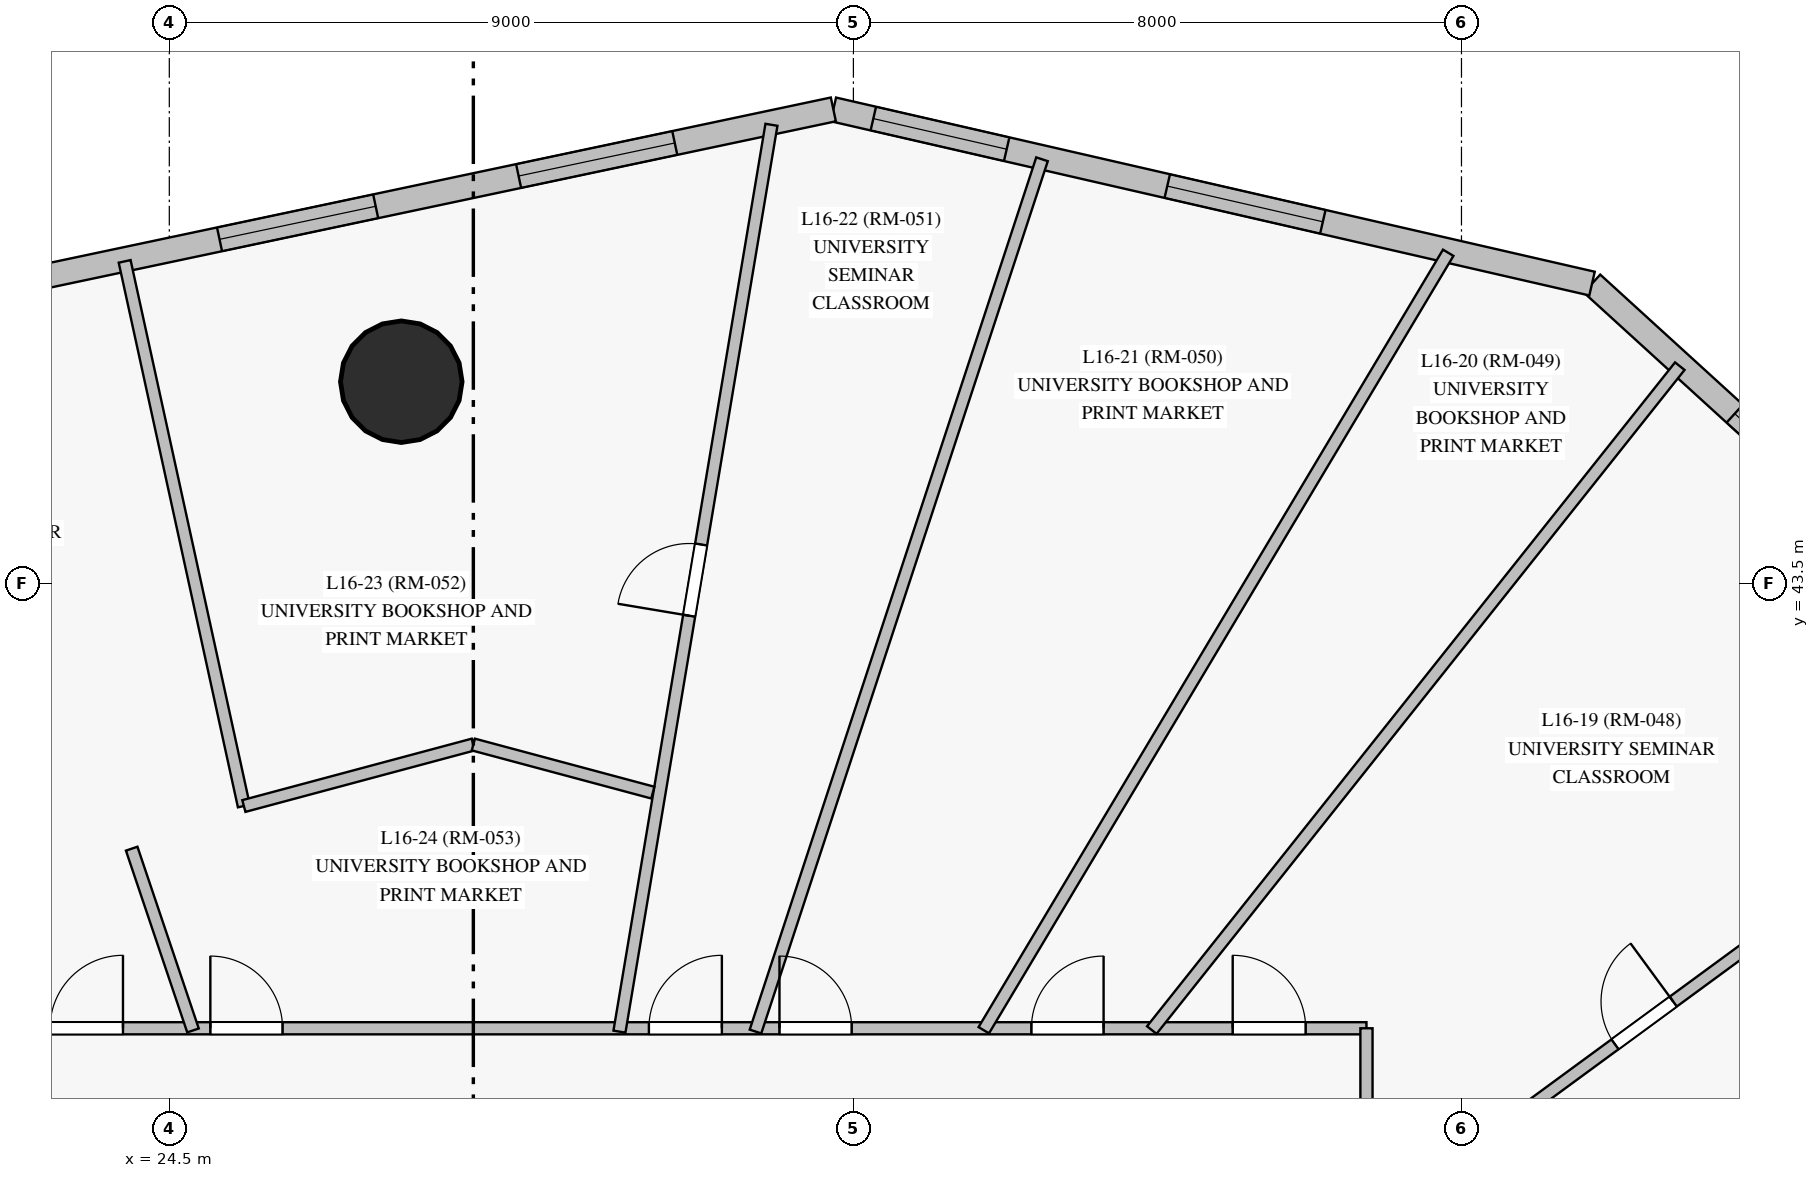
"""IFC4 building model, lengths in metres.
Left out: names, types, materials, properties, quantities, classifications, styles, units other than length and angle.
Written with IfcOpenShell. Run it as: python <this file> out.ifc"""

import sys

from ifc_helpers import new_model, si_unit, direction, frame, frame_2d, origin, origin_with_axes, origin_2d, place, context, subcontext, project, spatial, rectangle, circle, extrude, source, transform, mapped, element, fill, save


model = new_model("IFC4")
c1 = context("Model", 3, precision=1e-05, world=origin(), true_north=direction((0.0, 1.0)))
c2 = subcontext(c1, "Body", "Model", "MODEL_VIEW")
j1 = project(units=[si_unit("LENGTHUNIT", "METRE"), si_unit("PLANEANGLEUNIT", "RADIAN")], contexts=[c1])
p1 = place(None, origin())
s1 = spatial("IfcSite", under=j1, at=p1, CompositionType="ELEMENT")
p2 = place(p1, origin())
s2 = spatial("IfcBuilding", under=s1, at=p2, CompositionType="ELEMENT")
p3 = place(p2, frame((0.0, 0.0, 62.5)))
s3 = spatial("IfcBuildingStorey", under=s2, at=p3, CompositionType="ELEMENT", Elevation=62.5)
m1 = source(origin_with_axes(), c2, "Body", "SweptSolid", [
    extrude(circle(Radius=0.8, at=origin_2d()), origin(), (0.0, 0.0, 1.0), 3.6),
])
p4 = place(p3, frame((27.552, 46.156, 0.0), z_axis=(0.0, 0.0, 1.0), x_axis=(1.0, 0.0, 0.0)))
e1 = element("IfcColumn", 1, at=p4, inside=s3, PredefinedType="COLUMN", context=c2, shape_type="MappedRepresentation", body=[
    mapped(m1, transform((0.0, 0.0, 0.0), scale=1.0)),
])
p5 = place(p3, frame((52.626, 38.872, 0.0), z_axis=(0.0, 0.0, 1.0), x_axis=(-0.739069015005, 0.673629713611, 0.0)))
e2 = element("IfcWall", 2, at=p5, inside=s3, PredefinedType="SOLIDWALL", context=c2, shape_type="SweptSolid", body=[
    extrude(rectangle(XDim=12.729, YDim=0.32, at=frame_2d((6.365, 0.0))), origin(), (0.0, 0.0, 1.0), 3.02),
])
p6 = place(p5, frame((1.622, 0.0, 0.85)))
e3 = element("IfcOpeningElement", 3, at=p6, cuts=e2, PredefinedType="OPENING", context=c2, shape_type="SweptSolid", body=[
    extrude(rectangle(XDim=1.5, YDim=1.85, at=frame_2d((0.75, 0.925))), frame((0.0, 0.17, 0.0), z_axis=(0.0, -1.0, 0.0), x_axis=(1.0, 0.0, 0.0)), (0.0, 0.0, 1.0), 0.34),
])
p7 = place(p5, frame((8.089, 0.0, 0.85)))
e4 = element("IfcOpeningElement", 4, at=p7, cuts=e2, PredefinedType="OPENING", context=c2, shape_type="SweptSolid", body=[
    extrude(rectangle(XDim=2.1, YDim=1.95, at=frame_2d((1.05, 0.975))), frame((0.0, 0.17, 0.0), z_axis=(0.0, -1.0, 0.0), x_axis=(1.0, 0.0, 0.0)), (0.0, 0.0, 1.0), 0.34),
])
p8 = place(p3, frame((43.218, 47.447, 0.0), z_axis=(0.0, 0.0, 1.0), x_axis=(-0.974645302581, 0.223755523188, 0.0)))
e5 = element("IfcWall", 5, at=p8, inside=s3, PredefinedType="SOLIDWALL", context=c2, shape_type="SweptSolid", body=[
    extrude(rectangle(XDim=10.241, YDim=0.32, at=frame_2d((5.121, 0.0))), origin(), (0.0, 0.0, 1.0), 3.35),
])
p9 = place(p8, frame((3.634, 0.0, 0.85)))
e6 = element("IfcOpeningElement", 6, at=p9, cuts=e5, PredefinedType="OPENING", context=c2, shape_type="SweptSolid", body=[
    extrude(rectangle(XDim=2.1, YDim=1.95, at=frame_2d((1.05, 0.975))), frame((0.0, 0.17, 0.0), z_axis=(0.0, -1.0, 0.0), x_axis=(1.0, 0.0, 0.0)), (0.0, 0.0, 1.0), 0.34),
])
p10 = place(p8, frame((7.901, 0.0, 0.85)))
e7 = element("IfcOpeningElement", 7, at=p10, cuts=e5, PredefinedType="OPENING", context=c2, shape_type="SweptSolid", body=[
    extrude(rectangle(XDim=1.8, YDim=1.85, at=frame_2d((0.9, 0.925))), frame((0.0, 0.17, 0.0), z_axis=(0.0, -1.0, 0.0), x_axis=(1.0, 0.0, 0.0)), (0.0, 0.0, 1.0), 0.34),
])
p11 = place(p3, frame((33.236, 49.739, 0.0), z_axis=(0.0, 0.0, 1.0), x_axis=(-0.9783201392, -0.207098298485, 0.0)))
e8 = element("IfcWall", 8, at=p11, inside=s3, PredefinedType="SOLIDWALL", context=c2, shape_type="SweptSolid", body=[
    extrude(rectangle(XDim=14.861, YDim=0.32, at=frame_2d((7.43, 0.0))), origin(), (0.0, 0.0, 1.0), 3.35),
])
p12 = place(p11, frame((2.133, 0.0, 0.85)))
e9 = element("IfcOpeningElement", 9, at=p12, cuts=e8, PredefinedType="OPENING", context=c2, shape_type="SweptSolid", body=[
    extrude(rectangle(XDim=2.1, YDim=1.95, at=frame_2d((1.05, 0.975))), frame((0.0, 0.17, 0.0), z_axis=(0.0, -1.0, 0.0), x_axis=(1.0, 0.0, 0.0)), (0.0, 0.0, 1.0), 0.34),
])
p13 = place(p11, frame((6.155, 0.0, 0.85)))
e10 = element("IfcOpeningElement", 10, at=p13, cuts=e8, PredefinedType="OPENING", context=c2, shape_type="SweptSolid", body=[
    extrude(rectangle(XDim=2.1, YDim=1.95, at=frame_2d((1.05, 0.975))), frame((0.0, 0.17, 0.0), z_axis=(0.0, -1.0, 0.0), x_axis=(1.0, 0.0, 0.0)), (0.0, 0.0, 1.0), 0.34),
])
p14 = place(p11, frame((11.118, 0.0, 0.85)))
e11 = element("IfcOpeningElement", 11, at=p14, cuts=e8, PredefinedType="OPENING", context=c2, shape_type="SweptSolid", body=[
    extrude(rectangle(XDim=2.1, YDim=1.95, at=frame_2d((1.05, 0.975))), frame((0.0, 0.17, 0.0), z_axis=(0.0, -1.0, 0.0), x_axis=(1.0, 0.0, 0.0)), (0.0, 0.0, 1.0), 0.34),
])
p15 = place(p3, frame((10.5, 37.65, 0.0), z_axis=(0.0, 0.0, 1.0), x_axis=(1.0, 0.0, 0.0)))
e12 = element("IfcWall", 12, at=p15, inside=s3, PredefinedType="PARTITIONING", context=c2, shape_type="SweptSolid", body=[
    extrude(rectangle(XDim=29.75, YDim=0.16, at=frame_2d((14.875, 0.0))), origin(), (0.0, 0.0, 1.0), 2.75),
])
p16 = place(p15, frame((27.99, 0.0, 0.0)))
e13 = element("IfcOpeningElement", 13, at=p16, cuts=e12, PredefinedType="OPENING", context=c2, shape_type="SweptSolid", body=[
    extrude(rectangle(XDim=0.96, YDim=2.15, at=frame_2d((0.48, 1.075))), frame((0.0, 0.09, 0.0), z_axis=(0.0, -1.0, 0.0), x_axis=(1.0, 0.0, 0.0)), (0.0, 0.0, 1.0), 0.18),
])
p17 = place(p15, frame((25.342, 0.0, 0.0)))
e14 = element("IfcOpeningElement", 14, at=p17, cuts=e12, PredefinedType="OPENING", context=c2, shape_type="SweptSolid", body=[
    extrude(rectangle(XDim=0.95, YDim=2.15, at=frame_2d((0.475, 1.075))), frame((0.0, 0.09, 0.0), z_axis=(0.0, -1.0, 0.0), x_axis=(1.0, 0.0, 0.0)), (0.0, 0.0, 1.0), 0.18),
])
p18 = place(p15, frame((22.028, 0.0, 0.0)))
e15 = element("IfcOpeningElement", 15, at=p18, cuts=e12, PredefinedType="OPENING", context=c2, shape_type="SweptSolid", body=[
    extrude(rectangle(XDim=0.95, YDim=2.15, at=frame_2d((0.475, 1.075))), frame((0.0, 0.09, 0.0), z_axis=(0.0, -1.0, 0.0), x_axis=(1.0, 0.0, 0.0)), (0.0, 0.0, 1.0), 0.18),
])
p19 = place(p15, frame((20.31, 0.0, 0.0)))
e16 = element("IfcOpeningElement", 16, at=p19, cuts=e12, PredefinedType="OPENING", context=c2, shape_type="SweptSolid", body=[
    extrude(rectangle(XDim=0.96, YDim=2.15, at=frame_2d((0.48, 1.075))), frame((0.0, 0.09, 0.0), z_axis=(0.0, -1.0, 0.0), x_axis=(1.0, 0.0, 0.0)), (0.0, 0.0, 1.0), 0.18),
])
p20 = place(p15, frame((14.54, 0.0, 0.0)))
e17 = element("IfcOpeningElement", 17, at=p20, cuts=e12, PredefinedType="OPENING", context=c2, shape_type="SweptSolid", body=[
    extrude(rectangle(XDim=0.95, YDim=2.15, at=frame_2d((0.475, 1.075))), frame((0.0, 0.09, 0.0), z_axis=(0.0, -1.0, 0.0), x_axis=(1.0, 0.0, 0.0)), (0.0, 0.0, 1.0), 0.18),
])
p21 = place(p15, frame((12.43, 0.0, 0.0)))
e18 = element("IfcOpeningElement", 18, at=p21, cuts=e12, PredefinedType="OPENING", context=c2, shape_type="SweptSolid", body=[
    extrude(rectangle(XDim=0.96, YDim=2.15, at=frame_2d((0.48, 1.075))), frame((0.0, 0.09, 0.0), z_axis=(0.0, -1.0, 0.0), x_axis=(1.0, 0.0, 0.0)), (0.0, 0.0, 1.0), 0.18),
])
p22 = place(p15, frame((9.938, 0.0, 0.0)))
e19 = element("IfcOpeningElement", 19, at=p22, cuts=e12, PredefinedType="OPENING", context=c2, shape_type="SweptSolid", body=[
    extrude(rectangle(XDim=0.95, YDim=2.15, at=frame_2d((0.475, 1.075))), frame((0.0, 0.09, 0.0), z_axis=(0.0, -1.0, 0.0), x_axis=(1.0, 0.0, 0.0)), (0.0, 0.0, 1.0), 0.18),
])
p23 = place(p15, frame((6.962, 0.0, 0.0)))
e20 = element("IfcOpeningElement", 20, at=p23, cuts=e12, PredefinedType="OPENING", context=c2, shape_type="SweptSolid", body=[
    extrude(rectangle(XDim=0.95, YDim=2.15, at=frame_2d((0.475, 1.075))), frame((0.0, 0.09, 0.0), z_axis=(0.0, -1.0, 0.0), x_axis=(1.0, 0.0, 0.0)), (0.0, 0.0, 1.0), 0.18),
])
p24 = place(p3, frame((40.25, 37.65, 0.0), z_axis=(0.0, 0.0, 1.0), x_axis=(0.0, -1.0, 0.0)))
e21 = element("IfcWall", 21, at=p24, inside=s3, PredefinedType="PARTITIONING", context=c2, shape_type="SweptSolid", body=[
    extrude(rectangle(XDim=22.3, YDim=0.16, at=frame_2d((11.15, 0.0))), origin(), (0.0, 0.0, 1.0), 2.75),
])
p25 = place(p24, frame((16.25, 0.0, 0.0)))
e22 = element("IfcOpeningElement", 22, at=p25, cuts=e21, PredefinedType="OPENING", context=c2, shape_type="SweptSolid", body=[
    extrude(rectangle(XDim=0.95, YDim=2.15, at=frame_2d((0.475, 1.075))), frame((0.0, 0.09, 0.0), z_axis=(0.0, -1.0, 0.0), x_axis=(1.0, 0.0, 0.0)), (0.0, 0.0, 1.0), 0.18),
])
p26 = place(p24, frame((13.83, 0.0, 0.0)))
e23 = element("IfcOpeningElement", 23, at=p26, cuts=e21, PredefinedType="OPENING", context=c2, shape_type="SweptSolid", body=[
    extrude(rectangle(XDim=0.96, YDim=2.15, at=frame_2d((0.48, 1.075))), frame((0.0, 0.09, 0.0), z_axis=(0.0, -1.0, 0.0), x_axis=(1.0, 0.0, 0.0)), (0.0, 0.0, 1.0), 0.18),
])
p27 = place(p24, frame((10.385, 0.0, 0.0)))
e24 = element("IfcOpeningElement", 24, at=p27, cuts=e21, PredefinedType="OPENING", context=c2, shape_type="SweptSolid", body=[
    extrude(rectangle(XDim=0.95, YDim=2.15, at=frame_2d((0.475, 1.075))), frame((0.0, 0.09, 0.0), z_axis=(0.0, -1.0, 0.0), x_axis=(1.0, 0.0, 0.0)), (0.0, 0.0, 1.0), 0.18),
])
p28 = place(p3, frame((30.422, 37.606, 0.0), z_axis=(0.0, 0.0, 1.0), x_axis=(0.16531531348, 0.986240765295, 0.0)))
e25 = element("IfcWall", 25, at=p28, inside=s3, PredefinedType="PARTITIONING", context=c2, shape_type="SweptSolid", body=[
    extrude(rectangle(XDim=12.097, YDim=0.16, at=frame_2d((6.048, 0.0))), origin(), (0.0, 0.0, 1.0), 3.35),
])
p29 = place(p28, frame((5.548, 0.0, 0.0)))
e26 = element("IfcOpeningElement", 26, at=p29, cuts=e25, PredefinedType="OPENING", context=c2, shape_type="SweptSolid", body=[
    extrude(rectangle(XDim=0.95, YDim=2.15, at=frame_2d((0.475, 1.075))), frame((0.0, 0.09, 0.0), z_axis=(0.0, -1.0, 0.0), x_axis=(1.0, 0.0, 0.0)), (0.0, 0.0, 1.0), 0.18),
])
p30 = place(p3, frame((32.212, 37.607, 0.0), z_axis=(0.0, 0.0, 1.0), x_axis=(0.312083182385, 0.950054781195, 0.0)))
e27 = element("IfcWall", 27, at=p30, inside=s3, PredefinedType="PARTITIONING", context=c2, shape_type="SweptSolid", body=[
    extrude(rectangle(XDim=12.079, YDim=0.16, at=frame_2d((6.039, 0.0))), origin(), (0.0, 0.0, 1.0), 3.35),
])
p31 = place(p3, frame((41.452, 33.706, 0.0), z_axis=(0.0, 0.0, 1.0), x_axis=(0.87188055056, 0.489718598335, 0.0)))
e28 = element("IfcWall", 28, at=p31, inside=s3, PredefinedType="PARTITIONING", context=c2, shape_type="SweptSolid", body=[
    extrude(rectangle(XDim=11.921, YDim=0.16, at=frame_2d((5.961, 0.0))), origin(), (0.0, 0.0, 1.0), 3.35),
])
p32 = place(p3, frame((35.215, 37.624, 0.0), z_axis=(0.0, 0.0, 1.0), x_axis=(0.512861528195, 0.858471346579, 0.0)))
e29 = element("IfcWall", 29, at=p32, inside=s3, PredefinedType="PARTITIONING", context=c2, shape_type="SweptSolid", body=[
    extrude(rectangle(XDim=11.914, YDim=0.16, at=frame_2d((5.957, 0.0))), origin(), (0.0, 0.0, 1.0), 3.35),
])
p33 = place(p3, frame((37.426, 37.626, 0.0), z_axis=(0.0, 0.0, 1.0), x_axis=(0.62246479183, 0.782647802611, 0.0)))
e30 = element("IfcWall", 30, at=p33, inside=s3, PredefinedType="PARTITIONING", context=c2, shape_type="SweptSolid", body=[
    extrude(rectangle(XDim=11.16, YDim=0.16, at=frame_2d((5.58, 0.0))), origin(), (0.0, 0.0, 1.0), 3.35),
])
p34 = place(p3, frame((40.226, 35.023, 0.0), z_axis=(0.0, 0.0, 1.0), x_axis=(0.806433081641, 0.591325362922, 0.0)))
e31 = element("IfcWall", 31, at=p34, inside=s3, PredefinedType="PARTITIONING", context=c2, shape_type="SweptSolid", body=[
    extrude(rectangle(XDim=9.119, YDim=0.16, at=frame_2d((4.56, 0.0))), origin(), (0.0, 0.0, 1.0), 3.35),
])
p35 = place(p34, frame((4.085, 0.0, 0.0)))
e32 = element("IfcOpeningElement", 32, at=p35, cuts=e31, PredefinedType="OPENING", context=c2, shape_type="SweptSolid", body=[
    extrude(rectangle(XDim=0.95, YDim=2.15, at=frame_2d((0.475, 1.075))), frame((0.0, 0.09, 0.0), z_axis=(0.0, -1.0, 0.0), x_axis=(1.0, 0.0, 0.0)), (0.0, 0.0, 1.0), 0.18),
])
p36 = place(p3, frame((25.481, 40.574, 0.0), z_axis=(0.0, 0.0, 1.0), x_axis=(-0.213820958003, 0.976872866815, 0.0)))
e33 = element("IfcWall", 33, at=p36, inside=s3, PredefinedType="PARTITIONING", context=c2, shape_type="SweptSolid", body=[
    extrude(rectangle(XDim=7.335, YDim=0.16, at=frame_2d((3.667, 0.0))), origin(), (0.0, 0.0, 1.0), 3.35),
])
p37 = place(p3, frame((28.5, 41.383, 0.0), z_axis=(0.0, 0.0, 1.0), x_axis=(-0.965934803012, -0.258785541192, 0.0)))
e34 = element("IfcWall", 34, at=p37, inside=s3, PredefinedType="PARTITIONING", context=c2, shape_type="SweptSolid", body=[
    extrude(rectangle(XDim=3.125, YDim=0.16, at=frame_2d((1.563, 0.0))), origin(), (0.0, 0.0, 1.0), 2.75),
])
p38 = place(p3, frame((24.812, 37.622, 0.0), z_axis=(0.0, 0.0, 1.0), x_axis=(-0.319650532491, 0.947535507028, 0.0)))
e35 = element("IfcWall", 35, at=p38, inside=s3, PredefinedType="PARTITIONING", context=c2, shape_type="SweptSolid", body=[
    extrude(rectangle(XDim=2.523, YDim=0.16, at=frame_2d((1.262, 0.0))), origin(), (0.0, 0.0, 1.0), 3.35),
])
p39 = place(p3, frame((30.861, 40.75, 0.0), z_axis=(0.0, 0.0, 1.0), x_axis=(-0.965934231635, 0.258787673887, 0.0)))
e36 = element("IfcWall", 36, at=p39, inside=s3, PredefinedType="PARTITIONING", context=c2, shape_type="SweptSolid", body=[
    extrude(rectangle(XDim=2.444, YDim=0.16, at=frame_2d((1.222, 0.0))), origin(), (0.0, 0.0, 1.0), 2.75),
])
m2 = source(origin_with_axes(), c2, "Body", "SweptSolid", [
    extrude(rectangle(XDim=2.1, YDim=1.95, at=frame_2d((1.05, 0.975))), frame((0.0, 0.03, 0.0), z_axis=(0.0, -1.0, 0.0), x_axis=(1.0, 0.0, 0.0)), (0.0, 0.0, 1.0), 0.06),
])
p40 = place(p7, origin())
e37 = element("IfcWindow", 37, at=p40, inside=s3, PartitioningType="SINGLE_PANEL", PredefinedType="WINDOW", context=c2, shape_type="MappedRepresentation", body=[
    mapped(m2, transform((0.0, 0.0, 0.0), scale=1.0)),
])
fill(e4, e37)
p41 = place(p9, origin())
e38 = element("IfcWindow", 38, at=p41, inside=s3, PartitioningType="SINGLE_PANEL", PredefinedType="WINDOW", context=c2, shape_type="MappedRepresentation", body=[
    mapped(m2, transform((0.0, 0.0, 0.0), scale=1.0)),
])
fill(e6, e38)
m3 = source(origin_with_axes(), c2, "Body", "SweptSolid", [
    extrude(rectangle(XDim=1.8, YDim=1.85, at=frame_2d((0.9, 0.925))), frame((0.0, 0.03, 0.0), z_axis=(0.0, -1.0, 0.0), x_axis=(1.0, 0.0, 0.0)), (0.0, 0.0, 1.0), 0.06),
])
p42 = place(p10, origin())
e39 = element("IfcWindow", 39, at=p42, inside=s3, PartitioningType="SINGLE_PANEL", PredefinedType="WINDOW", context=c2, shape_type="MappedRepresentation", body=[
    mapped(m3, transform((0.0, 0.0, 0.0), scale=1.0)),
])
fill(e7, e39)
p43 = place(p12, origin())
e40 = element("IfcWindow", 40, at=p43, inside=s3, PartitioningType="SINGLE_PANEL", PredefinedType="WINDOW", context=c2, shape_type="MappedRepresentation", body=[
    mapped(m2, transform((0.0, 0.0, 0.0), scale=1.0)),
])
fill(e9, e40)
p44 = place(p13, origin())
e41 = element("IfcWindow", 41, at=p44, inside=s3, PartitioningType="SINGLE_PANEL", PredefinedType="WINDOW", context=c2, shape_type="MappedRepresentation", body=[
    mapped(m2, transform((0.0, 0.0, 0.0), scale=1.0)),
])
fill(e10, e41)
m4 = source(origin_with_axes(), c2, "Body", "SweptSolid", [
    extrude(rectangle(XDim=0.96, YDim=2.15, at=frame_2d((0.48, 1.075))), frame((0.0, 0.025, 0.0), z_axis=(0.0, -1.0, 0.0), x_axis=(1.0, 0.0, 0.0)), (0.0, 0.0, 1.0), 0.05),
])
p45 = place(p16, origin())
e42 = element("IfcDoor", 42, at=p45, inside=s3, OperationType="SINGLE_SWING_LEFT", PredefinedType="DOOR", context=c2, shape_type="MappedRepresentation", body=[
    mapped(m4, transform((0.0, 0.0, 0.0), scale=1.0)),
])
fill(e13, e42)
m5 = source(origin_with_axes(), c2, "Body", "SweptSolid", [
    extrude(rectangle(XDim=0.95, YDim=2.15, at=frame_2d((0.475, 1.075))), frame((0.0, 0.025, 0.0), z_axis=(0.0, -1.0, 0.0), x_axis=(1.0, 0.0, 0.0)), (0.0, 0.0, 1.0), 0.05),
])
p46 = place(p17, origin())
e43 = element("IfcDoor", 43, at=p46, inside=s3, OperationType="SINGLE_SWING_RIGHT", PredefinedType="DOOR", context=c2, shape_type="MappedRepresentation", body=[
    mapped(m5, transform((0.0, 0.0, 0.0), scale=1.0)),
])
fill(e14, e43)
p47 = place(p18, origin())
e44 = element("IfcDoor", 44, at=p47, inside=s3, OperationType="SINGLE_SWING_LEFT", PredefinedType="DOOR", context=c2, shape_type="MappedRepresentation", body=[
    mapped(m5, transform((0.0, 0.0, 0.0), scale=1.0)),
])
fill(e15, e44)
p48 = place(p19, origin())
e45 = element("IfcDoor", 45, at=p48, inside=s3, OperationType="SINGLE_SWING_RIGHT", PredefinedType="DOOR", context=c2, shape_type="MappedRepresentation", body=[
    mapped(m4, transform((0.0, 0.0, 0.0), scale=1.0)),
])
fill(e16, e45)
p49 = place(p20, origin())
e46 = element("IfcDoor", 46, at=p49, inside=s3, OperationType="SINGLE_SWING_LEFT", PredefinedType="DOOR", context=c2, shape_type="MappedRepresentation", body=[
    mapped(m5, transform((0.0, 0.0, 0.0), scale=1.0)),
])
fill(e17, e46)
p50 = place(p21, origin())
e47 = element("IfcDoor", 47, at=p50, inside=s3, OperationType="SINGLE_SWING_RIGHT", PredefinedType="DOOR", context=c2, shape_type="MappedRepresentation", body=[
    mapped(m4, transform((0.0, 0.0, 0.0), scale=1.0)),
])
fill(e18, e47)
p51 = place(p35, origin())
e48 = element("IfcDoor", 48, at=p51, inside=s3, OperationType="SINGLE_SWING_RIGHT", PredefinedType="DOOR", context=c2, shape_type="MappedRepresentation", body=[
    mapped(m5, transform((0.0, 0.0, 0.0), scale=1.0)),
])
fill(e32, e48)
p52 = place(p29, origin())
e49 = element("IfcDoor", 49, at=p52, inside=s3, OperationType="SINGLE_SWING_LEFT", PredefinedType="DOOR", context=c2, shape_type="MappedRepresentation", body=[
    mapped(m5, transform((0.0, 0.0, 0.0), scale=1.0)),
])
fill(e26, e49)
save(model, sys.argv[1])
